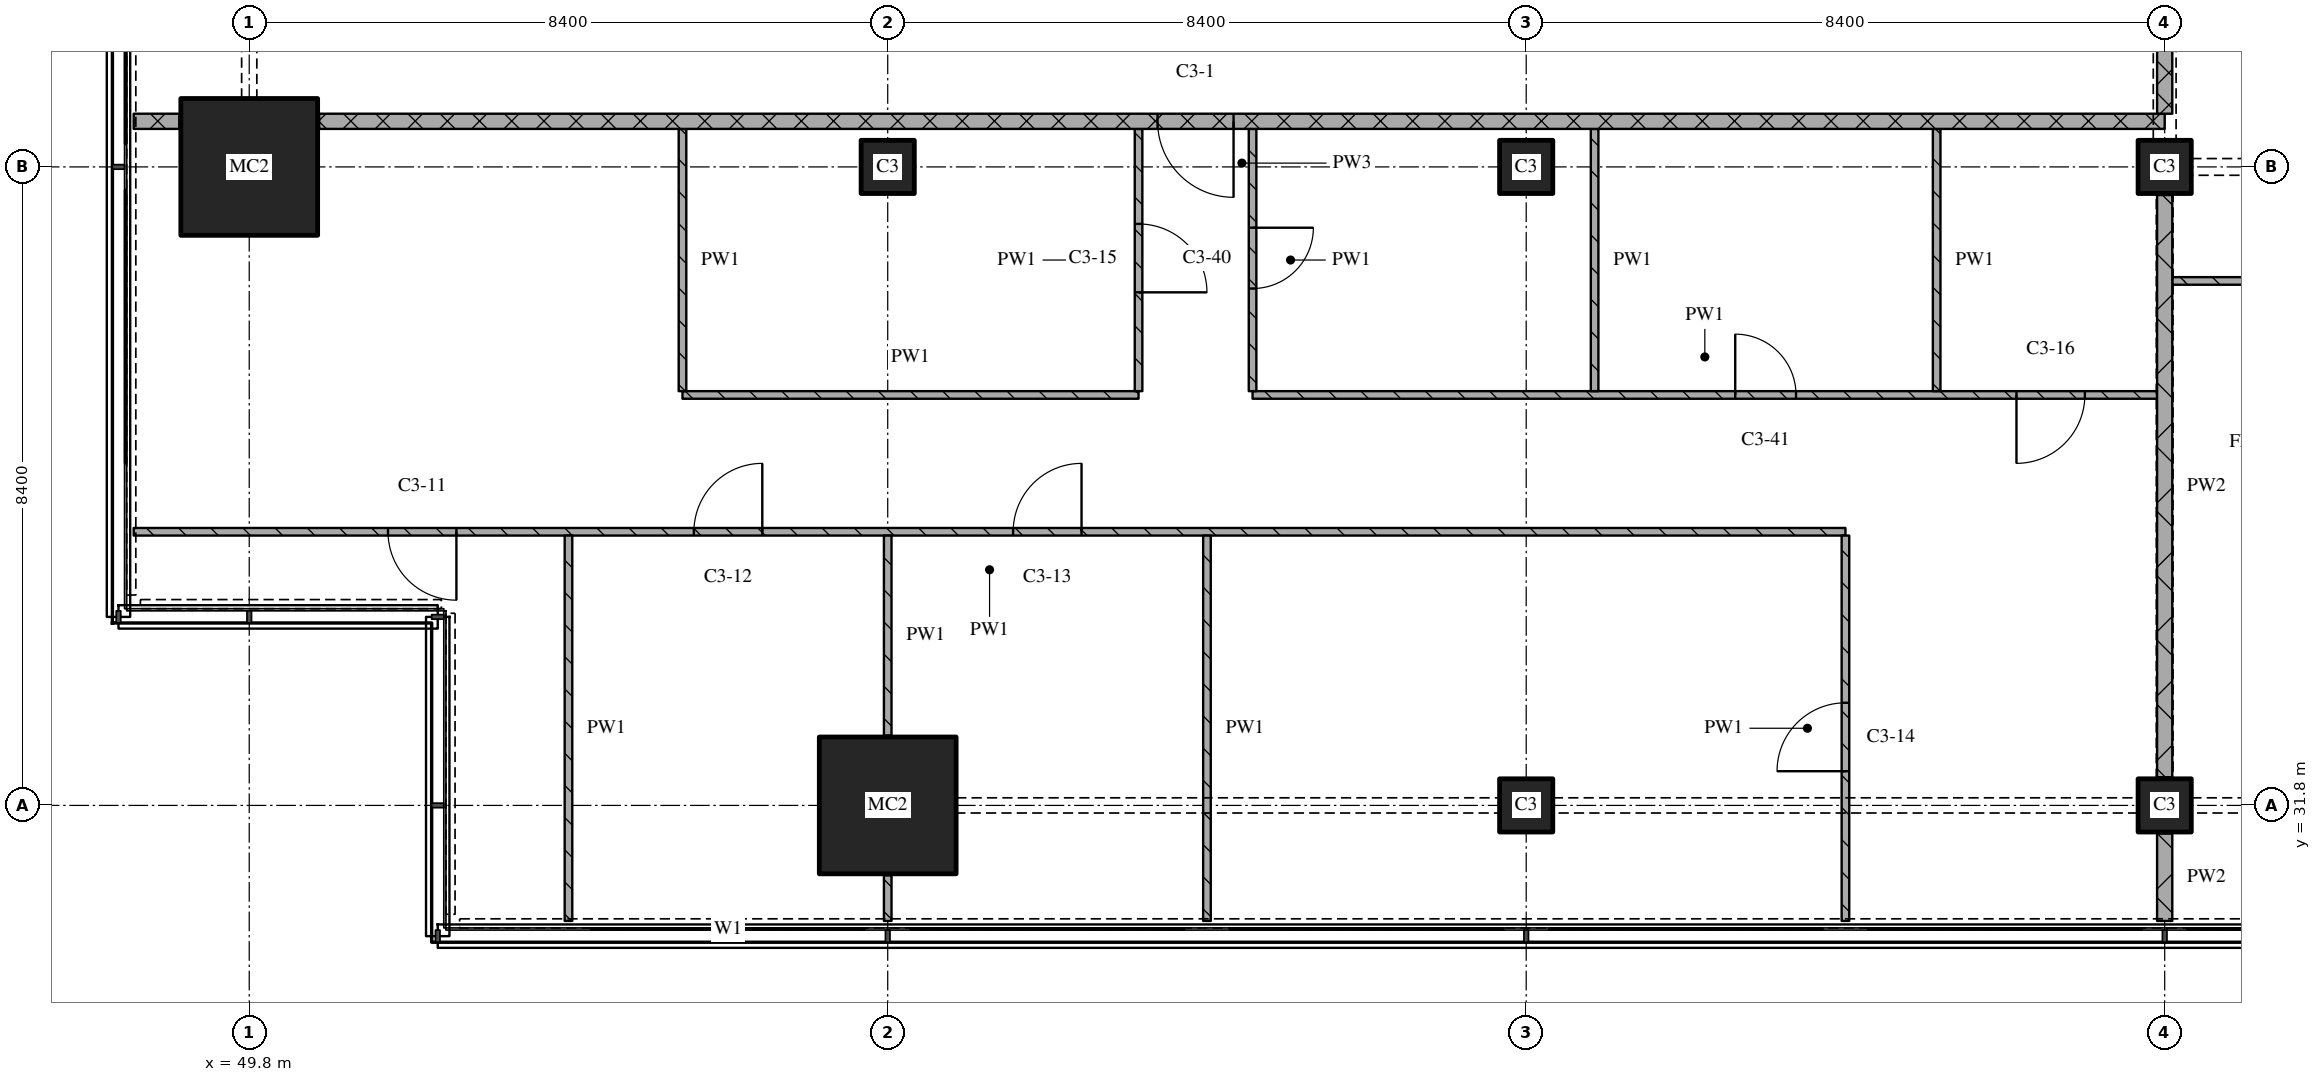
"""IFC4 building model, lengths in metres.
Left out: names, types, materials, properties, quantities, classifications, styles, units other than length and angle.
Written with IfcOpenShell. Run it as: python <this file> out.ifc"""

import sys

from ifc_helpers import new_model, si_unit, direction, frame, frame_2d, origin, origin_2d, place, context, subcontext, project, spatial, rectangle, extrude, element, fill, save


model = new_model("IFC4")
c1 = context("Model", 3, precision=1e-05, world=origin(), true_north=direction((0.0, 1.0)))
c2 = subcontext(c1, "Body", "Model", "MODEL_VIEW")
j1 = project(units=[si_unit("LENGTHUNIT", "METRE"), si_unit("PLANEANGLEUNIT", "RADIAN")], contexts=[c1])
p1 = place(None, origin())
s1 = spatial("IfcSite", under=j1, at=p1, CompositionType="ELEMENT")
p2 = place(p1, origin())
s2 = spatial("IfcBuilding", under=s1, at=p2, CompositionType="ELEMENT")
p3 = place(p2, frame((0.0, 0.0, 172.65)))
s3 = spatial("IfcBuildingStorey", under=s2, at=p3, CompositionType="ELEMENT", Elevation=172.65)
for number, where, z_axis, x_axis in (
    (1, (49.8, 40.2, 0.0), (0.0, 0.0, 1.0), (1.0, 0.0, 0.0)),
    (2, (58.2, 31.8, 0.0), (0.0, 0.0, 1.0), (1.0, 0.0, 0.0)),
):
    element("IfcColumn", number, at=place(p3, frame(where, z_axis=z_axis, x_axis=x_axis)), inside=s3, PredefinedType="COLUMN", context=c2, shape_type="SweptSolid", body=[
        extrude(rectangle(XDim=1.8, YDim=1.8, at=origin_2d()), origin(), (0.0, 0.0, 1.0), 3.6),
    ])
for number, where, z_axis, x_axis in (
    (3, (58.2, 40.2, 0.0), (0.0, 0.0, 1.0), (1.0, 0.0, 0.0)),
    (4, (66.6, 31.8, 0.0), (0.0, 0.0, 1.0), (1.0, 0.0, 0.0)),
    (5, (66.6, 40.2, 0.0), (0.0, 0.0, 1.0), (1.0, 0.0, 0.0)),
    (6, (75.0, 31.8, 0.0), (0.0, 0.0, 1.0), (1.0, 0.0, 0.0)),
    (7, (75.0, 40.2, 0.0), (0.0, 0.0, 1.0), (1.0, 0.0, 0.0)),
):
    element("IfcColumn", number, at=place(p3, frame(where, z_axis=z_axis, x_axis=x_axis)), inside=s3, PredefinedType="COLUMN", context=c2, shape_type="SweptSolid", body=[
        extrude(rectangle(XDim=0.7, YDim=0.7, at=origin_2d()), origin(), (0.0, 0.0, 1.0), 3.6),
    ])
p4 = place(p3, frame((70.8, 35.4, 0.0), z_axis=(0.0, 0.0, 1.0), x_axis=(-1.0, 0.0, 0.0)))
e8 = element("IfcWall", 8, at=p4, inside=s3, PredefinedType="PARTITIONING", context=c2, shape_type="SweptSolid", body=[
    extrude(rectangle(XDim=22.52, YDim=0.1, at=frame_2d((11.26, 0.0))), origin(), (0.0, 0.0, 1.0), 3.32),
])
p5 = place(p4, frame((10.05, 0.0, 0.0)))
e9 = element("IfcOpeningElement", 9, at=p5, cuts=e8, PredefinedType="OPENING", context=c2, shape_type="SweptSolid", body=[
    extrude(rectangle(XDim=0.9, YDim=2.1, at=frame_2d((0.45, 1.05))), frame((0.0, 0.06, 0.0), z_axis=(0.0, -1.0, 0.0), x_axis=(1.0, 0.0, 0.0)), (0.0, 0.0, 1.0), 0.12),
])
p6 = place(p4, frame((14.25, 0.0, 0.0)))
e10 = element("IfcOpeningElement", 10, at=p6, cuts=e8, PredefinedType="OPENING", context=c2, shape_type="SweptSolid", body=[
    extrude(rectangle(XDim=0.9, YDim=2.1, at=frame_2d((0.45, 1.05))), frame((0.0, 0.06, 0.0), z_axis=(0.0, -1.0, 0.0), x_axis=(1.0, 0.0, 0.0)), (0.0, 0.0, 1.0), 0.12),
])
p7 = place(p4, frame((18.274, 0.0, 0.0)))
e11 = element("IfcOpeningElement", 11, at=p7, cuts=e8, PredefinedType="OPENING", context=c2, shape_type="SweptSolid", body=[
    extrude(rectangle(XDim=0.9, YDim=2.1, at=frame_2d((0.45, 1.05))), frame((0.0, 0.06, 0.0), z_axis=(0.0, -1.0, 0.0), x_axis=(1.0, 0.0, 0.0)), (0.0, 0.0, 1.0), 0.12),
])
p8 = place(p3, frame((55.5, 37.2, 0.0), z_axis=(0.0, 0.0, 1.0), x_axis=(1.0, 0.0, 0.0)))
e12 = element("IfcWall", 12, at=p8, inside=s3, PredefinedType="PARTITIONING", context=c2, shape_type="SweptSolid", body=[
    extrude(rectangle(XDim=6.0, YDim=0.1, at=frame_2d((3.0, 0.0))), origin(), (0.0, 0.0, 1.0), 3.32),
])
p9 = place(p3, frame((63.0, 37.2, 0.0), z_axis=(0.0, 0.0, 1.0), x_axis=(1.0, 0.0, 0.0)))
e13 = element("IfcWall", 13, at=p9, inside=s3, PredefinedType="PARTITIONING", context=c2, shape_type="SweptSolid", body=[
    extrude(rectangle(XDim=11.9, YDim=0.1, at=frame_2d((5.95, 0.0))), origin(), (0.0, 0.0, 1.0), 3.32),
])
p10 = place(p9, frame((6.35, 0.0, 0.0)))
e14 = element("IfcOpeningElement", 14, at=p10, cuts=e13, PredefinedType="OPENING", context=c2, shape_type="SweptSolid", body=[
    extrude(rectangle(XDim=0.8, YDim=2.1, at=frame_2d((0.4, 1.05))), frame((0.0, 0.06, 0.0), z_axis=(0.0, -1.0, 0.0), x_axis=(1.0, 0.0, 0.0)), (0.0, 0.0, 1.0), 0.12),
])
p11 = place(p9, frame((10.05, 0.0, 0.0)))
e15 = element("IfcOpeningElement", 15, at=p11, cuts=e13, PredefinedType="OPENING", context=c2, shape_type="SweptSolid", body=[
    extrude(rectangle(XDim=0.9, YDim=2.1, at=frame_2d((0.45, 1.05))), frame((0.0, 0.06, 0.0), z_axis=(0.0, -1.0, 0.0), x_axis=(1.0, 0.0, 0.0)), (0.0, 0.0, 1.0), 0.12),
])
p12 = place(p3, frame((75.1, 38.7, 0.0), z_axis=(0.0, 0.0, 1.0), x_axis=(1.0, 0.0, 0.0)))
e16 = element("IfcWall", 16, at=p12, inside=s3, PredefinedType="PARTITIONING", context=c2, shape_type="SweptSolid", body=[
    extrude(rectangle(XDim=6.8, YDim=0.1, at=frame_2d((3.4, 0.0))), origin(), (0.0, 0.0, 1.0), 3.32),
])
p13 = place(p12, frame((1.75, 0.0, 0.0)))
e17 = element("IfcOpeningElement", 17, at=p13, cuts=e16, PredefinedType="OPENING", context=c2, shape_type="SweptSolid", body=[
    extrude(rectangle(XDim=0.8, YDim=2.1, at=frame_2d((0.4, 1.05))), frame((0.0, 0.06, 0.0), z_axis=(0.0, -1.0, 0.0), x_axis=(1.0, 0.0, 0.0)), (0.0, 0.0, 1.0), 0.12),
])
p14 = place(p12, frame((5.2, 0.0, 0.0)))
e18 = element("IfcOpeningElement", 18, at=p14, cuts=e16, PredefinedType="OPENING", context=c2, shape_type="SweptSolid", body=[
    extrude(rectangle(XDim=0.8, YDim=2.1, at=frame_2d((0.4, 1.05))), frame((0.0, 0.06, 0.0), z_axis=(0.0, -1.0, 0.0), x_axis=(1.0, 0.0, 0.0)), (0.0, 0.0, 1.0), 0.12),
])
p15 = place(p3, frame((48.28, 40.8, 0.0), z_axis=(0.0, 0.0, 1.0), x_axis=(1.0, 0.0, 0.0)))
e19 = element("IfcWall", 19, at=p15, inside=s3, PredefinedType="PARTITIONING", context=c2, shape_type="SweptSolid", body=[
    extrude(rectangle(XDim=0.6, YDim=0.2, at=frame_2d((0.3, 0.0))), origin(), (0.0, 0.0, 1.0), 3.32),
])
p16 = place(p3, frame((75.0, 40.8, 0.0), z_axis=(0.0, 0.0, 1.0), x_axis=(-1.0, 0.0, 0.0)))
e20 = element("IfcWall", 20, at=p16, inside=s3, PredefinedType="PARTITIONING", context=c2, shape_type="SweptSolid", body=[
    extrude(rectangle(XDim=24.28, YDim=0.2, at=frame_2d((12.14, 0.0))), origin(), (0.0, 0.0, 1.0), 3.32),
])
p17 = place(p16, frame((12.25, 0.0, 0.0)))
e21 = element("IfcOpeningElement", 21, at=p17, cuts=e20, PredefinedType="OPENING", context=c2, shape_type="SweptSolid", body=[
    extrude(rectangle(XDim=1.0, YDim=2.1, at=frame_2d((0.5, 1.05))), frame((0.0, 0.11, 0.0), z_axis=(0.0, -1.0, 0.0), x_axis=(1.0, 0.0, 0.0)), (0.0, 0.0, 1.0), 0.22),
])
p18 = place(p3, frame((54.0, 35.35, 0.0), z_axis=(0.0, 0.0, 1.0), x_axis=(0.0, -1.0, 0.0)))
e22 = element("IfcWall", 22, at=p18, inside=s3, PredefinedType="PARTITIONING", context=c2, shape_type="SweptSolid", body=[
    extrude(rectangle(XDim=5.07, YDim=0.1, at=frame_2d((2.535, 0.0))), origin(), (0.0, 0.0, 1.0), 3.32),
])
p19 = place(p3, frame((55.5, 40.7, 0.0), z_axis=(0.0, 0.0, 1.0), x_axis=(0.0, -1.0, 0.0)))
e23 = element("IfcWall", 23, at=p19, inside=s3, PredefinedType="PARTITIONING", context=c2, shape_type="SweptSolid", body=[
    extrude(rectangle(XDim=3.45, YDim=0.1, at=frame_2d((1.725, 0.0))), origin(), (0.0, 0.0, 1.0), 3.32),
])
p20 = place(p3, frame((58.2, 30.88, 0.0), z_axis=(0.0, 0.0, 1.0), x_axis=(0.0, -1.0, 0.0)))
e24 = element("IfcWall", 24, at=p20, inside=s3, PredefinedType="PARTITIONING", context=c2, shape_type="SweptSolid", body=[
    extrude(rectangle(XDim=0.6, YDim=0.1, at=frame_2d((0.3, 0.0))), origin(), (0.0, 0.0, 1.0), 3.32),
])
p21 = place(p3, frame((58.2, 35.35, 0.0), z_axis=(0.0, 0.0, 1.0), x_axis=(0.0, -1.0, 0.0)))
e25 = element("IfcWall", 25, at=p21, inside=s3, PredefinedType="PARTITIONING", context=c2, shape_type="SweptSolid", body=[
    extrude(rectangle(XDim=2.63, YDim=0.1, at=frame_2d((1.315, 0.0))), origin(), (0.0, 0.0, 1.0), 3.32),
])
p22 = place(p3, frame((61.5, 37.25, 0.0), z_axis=(0.0, 0.0, 1.0), x_axis=(0.0, 1.0, 0.0)))
e26 = element("IfcWall", 26, at=p22, inside=s3, PredefinedType="PARTITIONING", context=c2, shape_type="SweptSolid", body=[
    extrude(rectangle(XDim=3.45, YDim=0.1, at=frame_2d((1.725, 0.0))), origin(), (0.0, 0.0, 1.0), 3.32),
])
p23 = place(p22, frame((1.3, 0.0, 0.0)))
e27 = element("IfcOpeningElement", 27, at=p23, cuts=e26, PredefinedType="OPENING", context=c2, shape_type="SweptSolid", body=[
    extrude(rectangle(XDim=0.9, YDim=2.1, at=frame_2d((0.45, 1.05))), frame((0.0, 0.06, 0.0), z_axis=(0.0, -1.0, 0.0), x_axis=(1.0, 0.0, 0.0)), (0.0, 0.0, 1.0), 0.12),
])
p24 = place(p3, frame((62.4, 35.35, 0.0), z_axis=(0.0, 0.0, 1.0), x_axis=(0.0, -1.0, 0.0)))
e28 = element("IfcWall", 28, at=p24, inside=s3, PredefinedType="PARTITIONING", context=c2, shape_type="SweptSolid", body=[
    extrude(rectangle(XDim=5.07, YDim=0.1, at=frame_2d((2.535, 0.0))), origin(), (0.0, 0.0, 1.0), 3.32),
])
p25 = place(p3, frame((63.0, 40.7, 0.0), z_axis=(0.0, 0.0, 1.0), x_axis=(0.0, -1.0, 0.0)))
e29 = element("IfcWall", 29, at=p25, inside=s3, PredefinedType="PARTITIONING", context=c2, shape_type="SweptSolid", body=[
    extrude(rectangle(XDim=3.45, YDim=0.1, at=frame_2d((1.725, 0.0))), origin(), (0.0, 0.0, 1.0), 3.32),
])
p26 = place(p25, frame((1.3, 0.0, 0.0)))
e30 = element("IfcOpeningElement", 30, at=p26, cuts=e29, PredefinedType="OPENING", context=c2, shape_type="SweptSolid", body=[
    extrude(rectangle(XDim=0.8, YDim=2.1, at=frame_2d((0.4, 1.05))), frame((0.0, 0.06, 0.0), z_axis=(0.0, -1.0, 0.0), x_axis=(1.0, 0.0, 0.0)), (0.0, 0.0, 1.0), 0.12),
])
p27 = place(p3, frame((67.5, 40.7, 0.0), z_axis=(0.0, 0.0, 1.0), x_axis=(0.0, -1.0, 0.0)))
e31 = element("IfcWall", 31, at=p27, inside=s3, PredefinedType="PARTITIONING", context=c2, shape_type="SweptSolid", body=[
    extrude(rectangle(XDim=3.45, YDim=0.1, at=frame_2d((1.725, 0.0))), origin(), (0.0, 0.0, 1.0), 3.32),
])
p28 = place(p3, frame((70.8, 30.28, 0.0), z_axis=(0.0, 0.0, 1.0), x_axis=(0.0, 1.0, 0.0)))
e32 = element("IfcWall", 32, at=p28, inside=s3, PredefinedType="PARTITIONING", context=c2, shape_type="SweptSolid", body=[
    extrude(rectangle(XDim=5.07, YDim=0.1, at=frame_2d((2.535, 0.0))), origin(), (0.0, 0.0, 1.0), 3.32),
])
p29 = place(p28, frame((1.97, 0.0, 0.0)))
e33 = element("IfcOpeningElement", 33, at=p29, cuts=e32, PredefinedType="OPENING", context=c2, shape_type="SweptSolid", body=[
    extrude(rectangle(XDim=0.9, YDim=2.1, at=frame_2d((0.45, 1.05))), frame((0.0, 0.06, 0.0), z_axis=(0.0, -1.0, 0.0), x_axis=(1.0, 0.0, 0.0)), (0.0, 0.0, 1.0), 0.12),
])
p30 = place(p3, frame((72.0, 40.7, 0.0), z_axis=(0.0, 0.0, 1.0), x_axis=(0.0, -1.0, 0.0)))
e34 = element("IfcWall", 34, at=p30, inside=s3, PredefinedType="PARTITIONING", context=c2, shape_type="SweptSolid", body=[
    extrude(rectangle(XDim=3.45, YDim=0.1, at=frame_2d((1.725, 0.0))), origin(), (0.0, 0.0, 1.0), 3.32),
])
p31 = place(p3, frame((75.0, 43.1, 0.0), z_axis=(0.0, 0.0, 1.0), x_axis=(0.0, -1.0, 0.0)))
e35 = element("IfcWall", 35, at=p31, inside=s3, PredefinedType="PARTITIONING", context=c2, shape_type="SweptSolid", body=[
    extrude(rectangle(XDim=2.2, YDim=0.2, at=frame_2d((1.1, 0.0))), origin(), (0.0, 0.0, 1.0), 2.43),
])
p32 = place(p3, frame((75.0, 31.43, 0.0), z_axis=(0.0, 0.0, 1.0), x_axis=(0.0, -1.0, 0.0)))
e36 = element("IfcWall", 36, at=p32, inside=s3, PredefinedType="PARTITIONING", context=c2, shape_type="SweptSolid", body=[
    extrude(rectangle(XDim=1.15, YDim=0.2, at=frame_2d((0.575, 0.0))), origin(), (0.0, 0.0, 1.0), 3.32),
])
p33 = place(p3, frame((75.0, 39.83, 0.0), z_axis=(0.0, 0.0, 1.0), x_axis=(0.0, -1.0, 0.0)))
e37 = element("IfcWall", 37, at=p33, inside=s3, PredefinedType="PARTITIONING", context=c2, shape_type="SweptSolid", body=[
    extrude(rectangle(XDim=7.66, YDim=0.2, at=frame_2d((3.83, 0.0))), origin(), (0.0, 0.0, 1.0), 2.72),
])
p34 = place(p5, origin())
e38 = element("IfcDoor", 38, at=p34, inside=s3, OperationType="SINGLE_SWING_RIGHT", PredefinedType="DOOR", context=c2, shape_type="SweptSolid", body=[
    extrude(rectangle(XDim=0.9, YDim=2.1, at=frame_2d((0.45, 1.05))), frame((0.0, 0.025, 0.0), z_axis=(0.0, -1.0, 0.0), x_axis=(1.0, 0.0, 0.0)), (0.0, 0.0, 1.0), 0.05),
])
fill(e9, e38)
p35 = place(p6, origin())
e39 = element("IfcDoor", 39, at=p35, inside=s3, OperationType="SINGLE_SWING_RIGHT", PredefinedType="DOOR", context=c2, shape_type="SweptSolid", body=[
    extrude(rectangle(XDim=0.9, YDim=2.1, at=frame_2d((0.45, 1.05))), frame((0.0, 0.025, 0.0), z_axis=(0.0, -1.0, 0.0), x_axis=(1.0, 0.0, 0.0)), (0.0, 0.0, 1.0), 0.05),
])
fill(e10, e39)
p36 = place(p7, origin())
e40 = element("IfcDoor", 40, at=p36, inside=s3, OperationType="SINGLE_SWING_LEFT", PredefinedType="DOOR", context=c2, shape_type="SweptSolid", body=[
    extrude(rectangle(XDim=0.9, YDim=2.1, at=frame_2d((0.45, 1.05))), frame((0.0, 0.025, 0.0), z_axis=(0.0, -1.0, 0.0), x_axis=(1.0, 0.0, 0.0)), (0.0, 0.0, 1.0), 0.05),
])
fill(e11, e40)
p37 = place(p10, origin())
e41 = element("IfcDoor", 41, at=p37, inside=s3, OperationType="SINGLE_SWING_LEFT", PredefinedType="DOOR", context=c2, shape_type="SweptSolid", body=[
    extrude(rectangle(XDim=0.8, YDim=2.1, at=frame_2d((0.4, 1.05))), frame((0.0, 0.025, 0.0), z_axis=(0.0, -1.0, 0.0), x_axis=(1.0, 0.0, 0.0)), (0.0, 0.0, 1.0), 0.05),
])
fill(e14, e41)
p38 = place(p11, origin())
e42 = element("IfcDoor", 42, at=p38, inside=s3, OperationType="SINGLE_SWING_RIGHT", PredefinedType="DOOR", context=c2, shape_type="SweptSolid", body=[
    extrude(rectangle(XDim=0.9, YDim=2.1, at=frame_2d((0.45, 1.05))), frame((0.0, 0.025, 0.0), z_axis=(0.0, -1.0, 0.0), x_axis=(1.0, 0.0, 0.0)), (0.0, 0.0, 1.0), 0.05),
])
fill(e15, e42)
p39 = place(p17, origin())
e43 = element("IfcDoor", 43, at=p39, inside=s3, OperationType="SINGLE_SWING_LEFT", PredefinedType="DOOR", context=c2, shape_type="SweptSolid", body=[
    extrude(rectangle(XDim=1.0, YDim=2.1, at=frame_2d((0.5, 1.05))), frame((0.0, 0.025, 0.0), z_axis=(0.0, -1.0, 0.0), x_axis=(1.0, 0.0, 0.0)), (0.0, 0.0, 1.0), 0.05),
])
fill(e21, e43)
p40 = place(p23, origin())
e44 = element("IfcDoor", 44, at=p40, inside=s3, OperationType="SINGLE_SWING_RIGHT", PredefinedType="DOOR", context=c2, shape_type="SweptSolid", body=[
    extrude(rectangle(XDim=0.9, YDim=2.1, at=frame_2d((0.45, 1.05))), frame((0.0, 0.025, 0.0), z_axis=(0.0, -1.0, 0.0), x_axis=(1.0, 0.0, 0.0)), (0.0, 0.0, 1.0), 0.05),
])
fill(e27, e44)
p41 = place(p26, origin())
e45 = element("IfcDoor", 45, at=p41, inside=s3, OperationType="SINGLE_SWING_LEFT", PredefinedType="DOOR", context=c2, shape_type="SweptSolid", body=[
    extrude(rectangle(XDim=0.8, YDim=2.1, at=frame_2d((0.4, 1.05))), frame((0.0, 0.025, 0.0), z_axis=(0.0, -1.0, 0.0), x_axis=(1.0, 0.0, 0.0)), (0.0, 0.0, 1.0), 0.05),
])
fill(e30, e45)
p42 = place(p29, origin())
e46 = element("IfcDoor", 46, at=p42, inside=s3, OperationType="SINGLE_SWING_LEFT", PredefinedType="DOOR", context=c2, shape_type="SweptSolid", body=[
    extrude(rectangle(XDim=0.9, YDim=2.1, at=frame_2d((0.45, 1.05))), frame((0.0, 0.025, 0.0), z_axis=(0.0, -1.0, 0.0), x_axis=(1.0, 0.0, 0.0)), (0.0, 0.0, 1.0), 0.05),
])
fill(e33, e46)
save(model, sys.argv[1])
